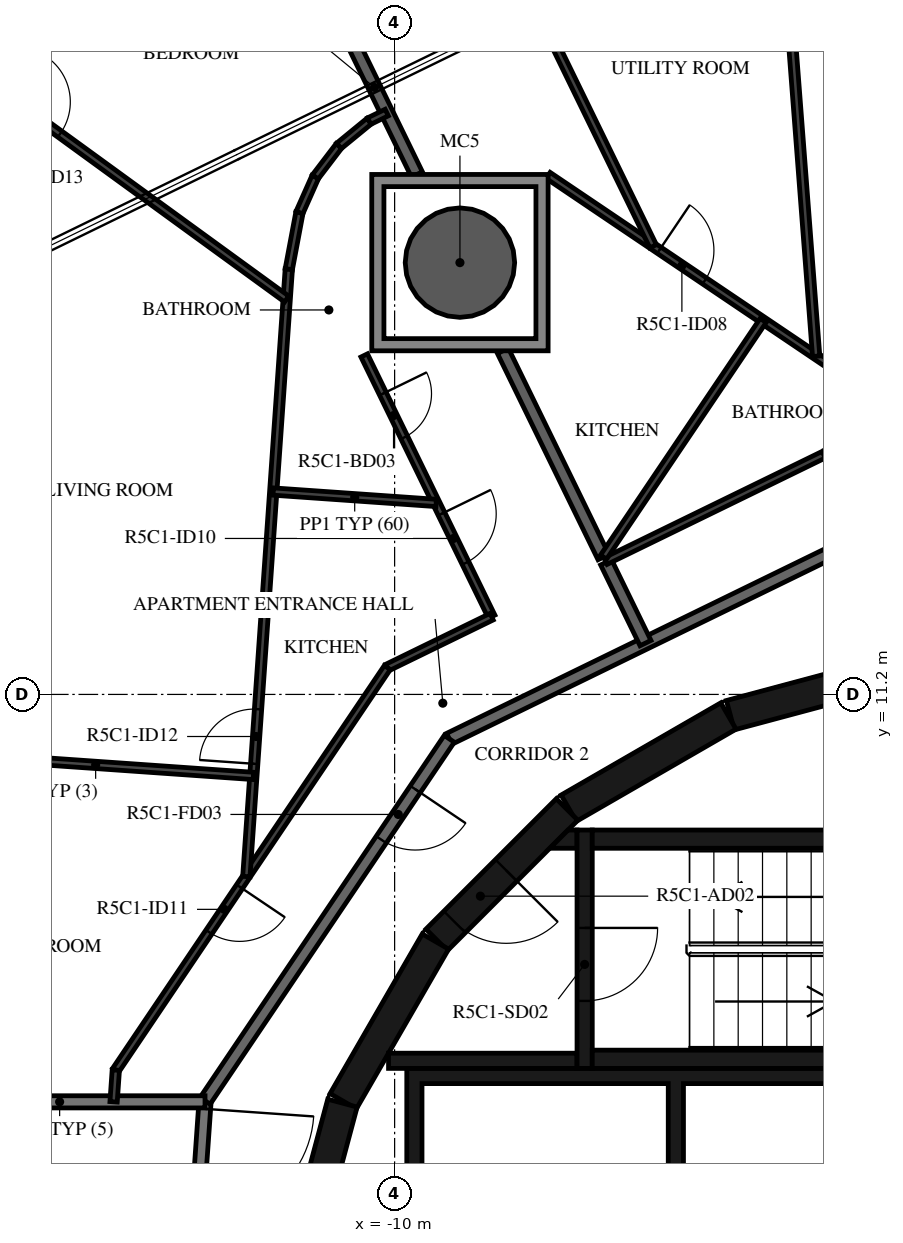
"""IFC4 building model, lengths in metres.
Left out: names, types, materials, properties, quantities, classifications, styles, units other than length and angle.
Written with IfcOpenShell. Run it as: python <this file> out.ifc"""

import sys

from ifc_helpers import new_model, si_unit, direction, frame, frame_2d, origin, origin_2d, place, context, subcontext, project, spatial, polyline, rectangle, hollow_circle, outline, extrude, element, fill, save


model = new_model("IFC4")
c1 = context("Model", 3, precision=1e-05, world=origin(), true_north=direction((0.0, 1.0)))
c2 = subcontext(c1, "Body", "Model", "MODEL_VIEW")
j1 = project(units=[si_unit("LENGTHUNIT", "METRE"), si_unit("PLANEANGLEUNIT", "RADIAN")], contexts=[c1])
p1 = place(None, origin())
s1 = spatial("IfcSite", under=j1, at=p1, CompositionType="ELEMENT")
p2 = place(p1, origin())
s2 = spatial("IfcBuilding", under=s1, at=p2, CompositionType="ELEMENT")
p3 = place(p2, frame((0.0, 0.0, 212.9)))
s3 = spatial("IfcBuildingStorey", under=s2, at=p3, CompositionType="ELEMENT", Elevation=212.9)
p4 = place(p3, frame((-8.926, 18.301, -0.38), z_axis=(0.0, 0.0, 1.0), x_axis=(1.0, 0.0, 0.0)))
e1 = element("IfcColumn", 1, at=p4, inside=s3, PredefinedType="COLUMN", context=c2, shape_type="SweptSolid", body=[
    extrude(hollow_circle(Radius=0.9, WallThickness=0.04, at=origin_2d()), origin(), (0.0, 0.0, 1.0), 3.5),
])
for number, where, z_axis, x_axis in (
    (2, (-1.55, 11.643, 0.0), (0.0, 0.0, 1.0), (-0.966, -0.259, 0.0)),
    (3, (-4.51, 10.845, 0.0), (0.0, 0.0, 1.0), (-0.866, -0.5, 0.0)),
):
    element("IfcWall", number, at=place(p3, frame(where, z_axis=z_axis, x_axis=x_axis)), inside=s3, PredefinedType="SHEAR", context=c2, shape_type="SweptSolid", body=[
        extrude(rectangle(XDim=3.033, YDim=0.5, at=frame_2d((1.516, 0.0))), origin(), (0.0, 0.0, 1.0), 3.12),
    ])
p5 = place(p3, frame((-7.164, 9.308, 0.0), z_axis=(0.0, 0.0, 1.0), x_axis=(-0.707106781187, -0.707106781187, 0.0)))
e4 = element("IfcWall", 4, at=p5, inside=s3, PredefinedType="SHEAR", context=c2, shape_type="SweptSolid", body=[
    extrude(rectangle(XDim=3.032, YDim=0.5, at=frame_2d((1.516, 0.0))), origin(), (0.0, 0.0, 1.0), 3.12),
])
p6 = place(p5, frame((1.416, 0.0, 0.0)))
e5 = element("IfcOpeningElement", 5, at=p6, cuts=e4, PredefinedType="OPENING", context=c2, shape_type="SweptSolid", body=[
    extrude(rectangle(XDim=1.2, YDim=2.1, at=frame_2d((0.6, 1.05))), frame((0.0, 0.26, 0.0), z_axis=(0.0, -1.0, 0.0), x_axis=(1.0, 0.0, 0.0)), (0.0, 0.0, 1.0), 0.52),
])
for number, where, z_axis, x_axis in (
    (6, (-9.329, 7.137, 0.0), (0.0, 0.0, 1.0), (-0.5, -0.866, 0.0)),
    (7, (-10.858, 4.479, 0.0), (0.0, 0.0, 1.0), (-0.259, -0.966, 0.0)),
):
    element("IfcWall", number, at=place(p3, frame(where, z_axis=z_axis, x_axis=x_axis)), inside=s3, PredefinedType="SHEAR", context=c2, shape_type="SweptSolid", body=[
        extrude(rectangle(XDim=3.033, YDim=0.5, at=frame_2d((1.516, 0.0))), origin(), (0.0, 0.0, 1.0), 3.12),
    ])
for number, where, z_axis, x_axis in (
    (8, (-6.75, 5.2, 0.0), (0.0, 0.0, 1.0), (1.0, 0.0, 0.0)),
    (9, (-6.75, 8.82, 0.0), (0.0, 0.0, 1.0), (1.0, 0.0, 0.0)),
):
    element("IfcWall", number, at=place(p3, frame(where, z_axis=z_axis, x_axis=x_axis)), inside=s3, PredefinedType="SHEAR", context=c2, shape_type="SweptSolid", body=[
        extrude(rectangle(XDim=6.75, YDim=0.3, at=frame_2d((3.375, 0.0))), origin(), (0.0, 0.0, 1.0), 3.12),
    ])
p7 = place(p3, frame((-6.875, 8.97, 0.0), z_axis=(0.0, 0.0, 1.0), x_axis=(0.0, -1.0, 0.0)))
e10 = element("IfcWall", 10, at=p7, inside=s3, PredefinedType="SHEAR", context=c2, shape_type="SweptSolid", body=[
    extrude(rectangle(XDim=3.92, YDim=0.25, at=frame_2d((1.96, 0.0))), origin(), (0.0, 0.0, 1.0), 3.12),
])
p8 = place(p7, frame((1.61, 0.0, 0.0)))
e11 = element("IfcOpeningElement", 11, at=p8, cuts=e10, PredefinedType="OPENING", context=c2, shape_type="SweptSolid", body=[
    extrude(rectangle(XDim=1.2, YDim=2.1, at=frame_2d((0.6, 1.05))), frame((0.0, 0.135, 0.0), z_axis=(0.0, -1.0, 0.0), x_axis=(1.0, 0.0, 0.0)), (0.0, 0.0, 1.0), 0.27),
])
p9 = place(p3, frame((-7.0, 5.175, 0.0), z_axis=(0.0, 0.0, 1.0), x_axis=(-1.0, 0.0, 0.0)))
e12 = element("IfcWall", 12, at=p9, inside=s3, PredefinedType="SHEAR", context=c2, shape_type="SweptSolid", body=[
    extrude(rectangle(XDim=3.1, YDim=0.25, at=frame_2d((1.55, 0.0))), origin(), (0.0, 0.0, 1.0), 3.12),
])
p10 = place(p3, origin())
e13 = element("IfcWall", 13, at=p10, inside=s3, PredefinedType="SHEAR", context=c2, shape_type="SweptSolid", body=[
    extrude(outline(polyline([(-7.148, 8.97), (-7.0, 8.97), (-7.0, 8.67), (-7.448, 8.67), (-7.148, 8.97)])), origin(), (0.0, 0.0, 1.0), 3.12),
])
p11 = place(p3, origin())
e14 = element("IfcWall", 14, at=p11, inside=s3, PredefinedType="SHEAR", context=c2, shape_type="SweptSolid", body=[
    extrude(outline(polyline([(-9.55, 4.8), (-5.5, 4.8), (-5.5, 1.9), (-5.25, 1.9), (-5.25, 4.8), (-1.2, 4.8), (-1.2, 1.9), (-0.95, 1.9), (-0.95, 4.8), (0.95, 4.8), (0.95, 1.9), (1.2, 1.9), (1.2, 4.8), (3.1, 4.8), (3.1, 1.9), (3.35, 1.9), (3.35, 4.8), (5.25, 4.8), (5.25, 1.9), (5.5, 1.9), (5.5, 4.8), (7.4, 4.8), (7.4, 1.9), (7.65, 1.9), (7.65, 4.8), (9.55, 4.8), (9.55, 1.9), (9.8, 1.9), (9.8, 4.8), (9.8, 5.05), (-9.8, 5.05), (-9.8, 4.8), (-9.8, 1.9), (-9.55, 1.9), (-9.55, 4.8)])), origin(), (0.0, 0.0, 1.0), 3.12),
])
p12 = place(p3, frame((-13.118, 4.5, 0.0), z_axis=(0.0, 0.0, 1.0), x_axis=(-0.069746872611, -0.99756472159, 0.0)))
e15 = element("IfcWall", 15, at=p12, inside=s3, PredefinedType="STANDARD", context=c2, shape_type="SweptSolid", body=[
    extrude(rectangle(XDim=3.574, YDim=0.2, at=frame_2d((1.787, 0.0))), origin(), (0.0, 0.0, 1.0), 3.12),
])
p13 = place(p12, frame((0.115, 0.0, 0.0)))
e16 = element("IfcOpeningElement", 16, at=p13, cuts=e15, PredefinedType="OPENING", context=c2, shape_type="SweptSolid", body=[
    extrude(rectangle(XDim=1.8, YDim=2.1, at=frame_2d((0.9, 1.05))), frame((0.0, 0.11, 0.0), z_axis=(0.0, -1.0, 0.0), x_axis=(1.0, 0.0, 0.0)), (0.0, 0.0, 1.0), 0.22),
])
p14 = place(p3, frame((-2.647, 13.618, 0.0), z_axis=(0.0, 0.0, 1.0), x_axis=(-0.898796543751, -0.438366026218, 0.0)))
e17 = element("IfcWall", 17, at=p14, inside=s3, PredefinedType="STANDARD", context=c2, shape_type="SweptSolid", body=[
    extrude(rectangle(XDim=7.181, YDim=0.2, at=frame_2d((3.591, 0.0))), origin(), (0.0, 0.0, 1.0), 3.12),
])
p15 = place(p3, frame((-9.101, 10.47, 0.0), z_axis=(0.0, 0.0, 1.0), x_axis=(-0.559195469534, -0.829035841718, 0.0)))
e18 = element("IfcWall", 18, at=p15, inside=s3, PredefinedType="STANDARD", context=c2, shape_type="SweptSolid", body=[
    extrude(rectangle(XDim=7.181, YDim=0.2, at=frame_2d((3.591, 0.0))), origin(), (0.0, 0.0, 1.0), 3.12),
])
p16 = place(p15, frame((1.0, 0.0, 0.0)))
e19 = element("IfcOpeningElement", 19, at=p16, cuts=e18, PredefinedType="OPENING", context=c2, shape_type="SweptSolid", body=[
    extrude(rectangle(XDim=1.0, YDim=2.1, at=frame_2d((0.5, 1.05))), frame((0.0, 0.11, 0.0), z_axis=(0.0, -1.0, 0.0), x_axis=(1.0, 0.0, 0.0)), (0.0, 0.0, 1.0), 0.22),
])
p17 = place(p3, frame((-13.118, 4.5, 0.0), z_axis=(0.0, 0.0, 1.0), x_axis=(-1.0, 0.0, 0.0)))
e20 = element("IfcWall", 20, at=p17, inside=s3, PredefinedType="STANDARD", context=c2, shape_type="SweptSolid", body=[
    extrude(rectangle(XDim=4.782, YDim=0.2, at=frame_2d((2.391, 0.0))), origin(), (0.0, 0.0, 1.0), 3.12),
])
p18 = place(p3, frame((-6.522, 13.373, 0.0), z_axis=(0.0, 0.0, 1.0), x_axis=(0.438277270821, -0.8988398266, 0.0)))
e21 = element("IfcWall", 21, at=p18, inside=s3, PredefinedType="STANDARD", context=c2, shape_type="SweptSolid", body=[
    extrude(rectangle(XDim=1.479, YDim=0.2, at=frame_2d((0.74, 0.0))), origin(), (0.0, 0.0, 1.0), 3.12),
])
p19 = place(p3, frame((-8.219, 16.851, 0.0), z_axis=(0.0, 0.0, 1.0), x_axis=(0.438291091101, -0.898833087654, 0.0)))
e22 = element("IfcWall", 22, at=p19, inside=s3, PredefinedType="STANDARD", context=c2, shape_type="SweptSolid", body=[
    extrude(rectangle(XDim=3.774, YDim=0.2, at=frame_2d((1.887, 0.0))), origin(), (0.0, 0.0, 1.0), 3.12),
])
p20 = place(p3, frame((-12.409, 25.442, 0.0), z_axis=(0.0, 0.0, 1.0), x_axis=(0.43838641251, -0.898786600549, 0.0)))
e23 = element("IfcWall", 23, at=p20, inside=s3, PredefinedType="STANDARD", context=c2, shape_type="SweptSolid", body=[
    extrude(rectangle(XDim=6.333, YDim=0.2, at=frame_2d((3.166, 0.0))), origin(), (0.0, 0.0, 1.0), 3.12),
])
p21 = place(p3, frame((4.477, 14.623, 0.0), z_axis=(0.0, 0.0, 1.0), x_axis=(-0.997564862172, 0.069744861884, 0.0)))
e24 = element("IfcWall", 24, at=p21, inside=s3, PredefinedType="PARTITIONING", context=c2, shape_type="SweptSolid", body=[
    extrude(rectangle(XDim=7.438, YDim=0.12, at=frame_2d((3.719, 0.0))), origin(), (0.0, 0.0, 1.0), 3.12),
])
p22 = place(p21, frame((0.2, 0.0, 0.0)))
e25 = element("IfcOpeningElement", 25, at=p22, cuts=e24, PredefinedType="OPENING", context=c2, shape_type="SweptSolid", body=[
    extrude(rectangle(XDim=0.9, YDim=2.1, at=frame_2d((0.45, 1.05))), frame((0.0, 0.07, 0.0), z_axis=(0.0, -1.0, 0.0), x_axis=(1.0, 0.0, 0.0)), (0.0, 0.0, 1.0), 0.14),
])
p23 = place(p21, frame((6.392, 0.0, 0.0)))
e26 = element("IfcOpeningElement", 26, at=p23, cuts=e24, PredefinedType="OPENING", context=c2, shape_type="SweptSolid", body=[
    extrude(rectangle(XDim=0.8, YDim=2.1, at=frame_2d((0.4, 1.05))), frame((0.0, 0.07, 0.0), z_axis=(0.0, -1.0, 0.0), x_axis=(1.0, 0.0, 0.0)), (0.0, 0.0, 1.0), 0.14),
])
p24 = place(p3, frame((-2.943, 15.142, 0.0), z_axis=(0.0, 0.0, 1.0), x_axis=(-0.89881075705, -0.438336883014, 0.0)))
e27 = element("IfcWall", 27, at=p24, inside=s3, PredefinedType="PARTITIONING", context=c2, shape_type="SweptSolid", body=[
    extrude(rectangle(XDim=3.992, YDim=0.12, at=frame_2d((1.996, 0.0))), origin(), (0.0, 0.0, 1.0), 3.12),
])
p25 = place(p3, frame((-7.476, 19.735, 0.0), z_axis=(0.0, 0.0, 1.0), x_axis=(0.829035412992, -0.559196105142, 0.0)))
e28 = element("IfcWall", 28, at=p25, inside=s3, PredefinedType="PARTITIONING", context=c2, shape_type="SweptSolid", body=[
    extrude(rectangle(XDim=8.531, YDim=0.12, at=frame_2d((4.266, 0.0))), origin(), (0.0, 0.0, 1.0), 3.12),
])
p26 = place(p25, frame((2.204, 0.0, 0.0)))
e29 = element("IfcOpeningElement", 29, at=p26, cuts=e28, PredefinedType="OPENING", context=c2, shape_type="SweptSolid", body=[
    extrude(rectangle(XDim=0.9, YDim=2.1, at=frame_2d((0.45, 1.05))), frame((0.0, 0.07, 0.0), z_axis=(0.0, -1.0, 0.0), x_axis=(1.0, 0.0, 0.0)), (0.0, 0.0, 1.0), 0.14),
])
p27 = place(p3, frame((-3.653, 24.394, 0.0), z_axis=(0.0, 0.0, 1.0), x_axis=(0.076513576433, -0.997068539581, 0.0)))
e30 = element("IfcWall", 30, at=p27, inside=s3, PredefinedType="PARTITIONING", context=c2, shape_type="SweptSolid", body=[
    extrude(rectangle(XDim=7.655, YDim=0.12, at=frame_2d((3.827, 0.0))), origin(), (0.0, 0.0, 1.0), 3.12),
])
p28 = place(p27, frame((0.6, 0.0, 0.0)))
e31 = element("IfcOpeningElement", 31, at=p28, cuts=e30, PredefinedType="OPENING", context=c2, shape_type="SweptSolid", body=[
    extrude(rectangle(XDim=0.9, YDim=2.1, at=frame_2d((0.45, 1.05))), frame((0.0, 0.07, 0.0), z_axis=(0.0, -1.0, 0.0), x_axis=(1.0, 0.0, 0.0)), (0.0, 0.0, 1.0), 0.14),
])
p29 = place(p3, frame((-3.939, 17.35, 0.0), z_axis=(0.0, 0.0, 1.0), x_axis=(-0.559193216274, -0.829037361566, 0.0)))
e32 = element("IfcWall", 32, at=p29, inside=s3, PredefinedType="PARTITIONING", context=c2, shape_type="SweptSolid", body=[
    extrude(rectangle(XDim=4.694, YDim=0.12, at=frame_2d((2.347, 0.0))), origin(), (0.0, 0.0, 1.0), 3.12),
])
p30 = place(p3, frame((-9.496, 26.254, 0.0), z_axis=(0.0, 0.0, 1.0), x_axis=(0.438361739807, -0.89879863433, 0.0)))
e33 = element("IfcWall", 33, at=p30, inside=s3, PredefinedType="PARTITIONING", context=c2, shape_type="SweptSolid", body=[
    extrude(rectangle(XDim=8.549, YDim=0.12, at=frame_2d((4.274, 0.0))), origin(), (0.0, 0.0, 1.0), 3.12),
])
p31 = place(p30, frame((0.4, 0.0, 0.0)))
e34 = element("IfcOpeningElement", 34, at=p31, cuts=e33, PredefinedType="OPENING", context=c2, shape_type="SweptSolid", body=[
    extrude(rectangle(XDim=0.9, YDim=2.1, at=frame_2d((0.45, 1.05))), frame((0.0, 0.07, 0.0), z_axis=(0.0, -1.0, 0.0), x_axis=(1.0, 0.0, 0.0)), (0.0, 0.0, 1.0), 0.14),
])
p32 = place(p3, frame((-10.5, 16.775, 0.0), z_axis=(0.0, 0.0, 1.0), x_axis=(0.438345136783, -0.898806731761, 0.0)))
e35 = element("IfcWall", 35, at=p32, inside=s3, PredefinedType="PARTITIONING", context=c2, shape_type="SweptSolid", body=[
    extrude(rectangle(XDim=4.78, YDim=0.12, at=frame_2d((2.39, 0.0))), origin(), (0.0, 0.0, 1.0), 3.12),
])
p33 = place(p32, frame((0.7, 0.0, 0.0)))
e36 = element("IfcOpeningElement", 36, at=p33, cuts=e35, PredefinedType="OPENING", context=c2, shape_type="SweptSolid", body=[
    extrude(rectangle(XDim=0.8, YDim=2.1, at=frame_2d((0.4, 1.05))), frame((0.0, 0.07, 0.0), z_axis=(0.0, -1.0, 0.0), x_axis=(1.0, 0.0, 0.0)), (0.0, 0.0, 1.0), 0.14),
])
p34 = place(p32, frame((2.899, 0.0, 0.0)))
e37 = element("IfcOpeningElement", 37, at=p34, cuts=e35, PredefinedType="OPENING", context=c2, shape_type="SweptSolid", body=[
    extrude(rectangle(XDim=0.9, YDim=2.1, at=frame_2d((0.45, 1.05))), frame((0.0, 0.07, 0.0), z_axis=(0.0, -1.0, 0.0), x_axis=(1.0, 0.0, 0.0)), (0.0, 0.0, 1.0), 0.14),
])
p35 = place(p3, frame((-8.405, 12.479, 0.0), z_axis=(0.0, 0.0, 1.0), x_axis=(-0.898784427692, -0.438390867307, 0.0)))
e38 = element("IfcWall", 38, at=p35, inside=s3, PredefinedType="PARTITIONING", context=c2, shape_type="SweptSolid", body=[
    extrude(rectangle(XDim=1.908, YDim=0.12, at=frame_2d((0.954, 0.0))), origin(), (0.0, 0.0, 1.0), 3.12),
])
p36 = place(p3, frame((-10.12, 11.642, 0.0), z_axis=(0.0, 0.0, 1.0), x_axis=(-0.55920080659, -0.829032241779, 0.0)))
e39 = element("IfcWall", 39, at=p36, inside=s3, PredefinedType="PARTITIONING", context=c2, shape_type="SweptSolid", body=[
    extrude(rectangle(XDim=7.985, YDim=0.12, at=frame_2d((3.992, 0.0))), origin(), (0.0, 0.0, 1.0), 3.12),
])
p37 = place(p36, frame((4.346, 0.0, 0.0)))
e40 = element("IfcOpeningElement", 40, at=p37, cuts=e39, PredefinedType="OPENING", context=c2, shape_type="SweptSolid", body=[
    extrude(rectangle(XDim=0.9, YDim=2.1, at=frame_2d((0.45, 1.05))), frame((0.0, 0.07, 0.0), z_axis=(0.0, -1.0, 0.0), x_axis=(1.0, 0.0, 0.0)), (0.0, 0.0, 1.0), 0.14),
])
p38 = place(p3, frame((-14.585, 5.022, 0.0), z_axis=(0.0, 0.0, 1.0), x_axis=(-0.069490327804, -0.997582625321, 0.0)))
e41 = element("IfcWall", 41, at=p38, inside=s3, PredefinedType="PARTITIONING", context=c2, shape_type="SweptSolid", body=[
    extrude(rectangle(XDim=0.523, YDim=0.12, at=frame_2d((0.262, 0.0))), origin(), (0.0, 0.0, 1.0), 3.12),
])
p39 = place(p3, frame((-12.439, 8.204, 0.0), z_axis=(0.0, 0.0, 1.0), x_axis=(0.069750037523, 0.997564500303, 0.0)))
e42 = element("IfcWall", 42, at=p39, inside=s3, PredefinedType="PARTITIONING", context=c2, shape_type="SweptSolid", body=[
    extrude(rectangle(XDim=10.014, YDim=0.12, at=frame_2d((5.007, 0.0))), origin(), (0.0, 0.0, 1.0), 3.12),
])
p40 = place(p39, frame((1.859, 0.0, 0.0)))
e43 = element("IfcOpeningElement", 43, at=p40, cuts=e42, PredefinedType="OPENING", context=c2, shape_type="SweptSolid", body=[
    extrude(rectangle(XDim=0.9, YDim=2.1, at=frame_2d((0.45, 1.05))), frame((0.0, 0.07, 0.0), z_axis=(0.0, -1.0, 0.0), x_axis=(1.0, 0.0, 0.0)), (0.0, 0.0, 1.0), 0.14),
])
p41 = place(p3, frame((-11.74, 18.194, 0.0), z_axis=(0.0, 0.0, 1.0), x_axis=(0.185144760846, 0.982711258474, 0.0)))
e44 = element("IfcWall", 44, at=p41, inside=s3, PredefinedType="PARTITIONING", context=c2, shape_type="SweptSolid", body=[
    extrude(rectangle(XDim=0.947, YDim=0.12, at=frame_2d((0.473, 0.0))), origin(), (0.0, 0.0, 1.0), 3.12),
])
for number, where, z_axis, x_axis in (
    (45, (-11.565, 19.125, 0.0), (0.0, 0.0, 1.0), (0.407, 0.914, 0.0)),
    (46, (-11.304, 19.711, 0.0), (0.0, 0.0, 1.0), (0.607, 0.795, 0.0)),
    (47, (-10.915, 20.221, 0.0), (0.0, 0.0, 1.0), (0.773, 0.634, 0.0)),
):
    element("IfcWall", number, at=place(p3, frame(where, z_axis=z_axis, x_axis=x_axis)), inside=s3, PredefinedType="PARTITIONING", context=c2, shape_type="SweptSolid", body=[
        extrude(rectangle(XDim=0.642, YDim=0.12, at=frame_2d((0.321, 0.0))), origin(), (0.0, 0.0, 1.0), 3.12),
    ])
p42 = place(p3, frame((-10.418, 20.628, 0.0), z_axis=(0.0, 0.0, 1.0), x_axis=(0.898943795765, 0.438063981692, 0.0)))
e48 = element("IfcWall", 48, at=p42, inside=s3, PredefinedType="PARTITIONING", context=c2, shape_type="SweptSolid", body=[
    extrude(rectangle(XDim=0.321, YDim=0.12, at=frame_2d((0.161, 0.0))), origin(), (0.0, 0.0, 1.0), 3.12),
])
p43 = place(p3, frame((-16.395, 21.061, 0.0), z_axis=(0.0, 0.0, 1.0), x_axis=(0.808810002497, -0.58807004673, 0.0)))
e49 = element("IfcWall", 49, at=p43, inside=s3, PredefinedType="PARTITIONING", context=c2, shape_type="SweptSolid", body=[
    extrude(rectangle(XDim=5.713, YDim=0.12, at=frame_2d((2.856, 0.0))), origin(), (0.0, 0.0, 1.0), 3.12),
])
p44 = place(p43, frame((0.2, 0.0, 0.0)))
e50 = element("IfcOpeningElement", 50, at=p44, cuts=e49, PredefinedType="OPENING", context=c2, shape_type="SweptSolid", body=[
    extrude(rectangle(XDim=0.9, YDim=2.1, at=frame_2d((0.45, 1.05))), frame((0.0, 0.07, 0.0), z_axis=(0.0, -1.0, 0.0), x_axis=(1.0, 0.0, 0.0)), (0.0, 0.0, 1.0), 0.14),
])
p45 = place(p3, frame((-11.996, 14.536, 0.0), z_axis=(0.0, 0.0, 1.0), x_axis=(0.997565991425, -0.069728708231, 0.0)))
e51 = element("IfcWall", 51, at=p45, inside=s3, PredefinedType="PARTITIONING", context=c2, shape_type="SweptSolid", body=[
    extrude(rectangle(XDim=2.686, YDim=0.12, at=frame_2d((1.343, 0.0))), origin(), (0.0, 0.0, 1.0), 3.12),
])
p46 = place(p3, frame((-17.51, 10.222, 0.0), z_axis=(0.0, 0.0, 1.0), x_axis=(0.997563184303, -0.069768856397, 0.0)))
e52 = element("IfcWall", 52, at=p46, inside=s3, PredefinedType="PARTITIONING", context=c2, shape_type="SweptSolid", body=[
    extrude(rectangle(XDim=5.2, YDim=0.12, at=frame_2d((2.6, 0.0))), origin(), (0.0, 0.0, 1.0), 2.73),
])
p47 = place(p3, origin())
e53 = element("IfcWall", 53, at=p47, inside=s3, PredefinedType="STANDARD", context=c2, shape_type="SweptSolid", body=[
    extrude(outline(polyline([(-7.476, 19.751), (-7.476, 16.851), (-10.376, 16.851), (-10.376, 19.751), (-7.476, 19.751)]), holes=[polyline([(-10.176, 17.051), (-7.676, 17.051), (-7.676, 19.551), (-10.176, 19.551), (-10.176, 17.051)])]), origin(), (0.0, 0.0, 1.0), 3.12),
])
p48 = place(p8, origin())
e54 = element("IfcDoor", 54, at=p48, inside=s3, OperationType="SINGLE_SWING_LEFT", PredefinedType="DOOR", context=c2, shape_type="SweptSolid", body=[
    extrude(rectangle(XDim=1.2, YDim=2.1, at=frame_2d((0.6, 1.05))), frame((0.0, 0.025, 0.0), z_axis=(0.0, -1.0, 0.0), x_axis=(1.0, 0.0, 0.0)), (0.0, 0.0, 1.0), 0.05),
])
fill(e11, e54)
p49 = place(p6, origin())
e55 = element("IfcDoor", 55, at=p49, inside=s3, OperationType="SINGLE_SWING_RIGHT", PredefinedType="DOOR", context=c2, shape_type="SweptSolid", body=[
    extrude(rectangle(XDim=1.2, YDim=2.1, at=frame_2d((0.6, 1.05))), frame((0.0, 0.025, 0.0), z_axis=(0.0, -1.0, 0.0), x_axis=(1.0, 0.0, 0.0)), (0.0, 0.0, 1.0), 0.05),
])
fill(e5, e55)
p50 = place(p26, origin())
e56 = element("IfcDoor", 56, at=p50, inside=s3, OperationType="SINGLE_SWING_LEFT", PredefinedType="DOOR", context=c2, shape_type="SweptSolid", body=[
    extrude(rectangle(XDim=0.9, YDim=2.1, at=frame_2d((0.45, 1.05))), frame((0.0, 0.025, 0.0), z_axis=(0.0, -1.0, 0.0), x_axis=(1.0, 0.0, 0.0)), (0.0, 0.0, 1.0), 0.05),
])
fill(e29, e56)
p51 = place(p16, origin())
e57 = element("IfcDoor", 57, at=p51, inside=s3, OperationType="SINGLE_SWING_LEFT", PredefinedType="DOOR", context=c2, shape_type="SweptSolid", body=[
    extrude(rectangle(XDim=1.0, YDim=2.1, at=frame_2d((0.5, 1.05))), frame((0.0, 0.025, 0.0), z_axis=(0.0, -1.0, 0.0), x_axis=(1.0, 0.0, 0.0)), (0.0, 0.0, 1.0), 0.05),
])
fill(e19, e57)
p52 = place(p33, origin())
e58 = element("IfcDoor", 58, at=p52, inside=s3, OperationType="SINGLE_SWING_LEFT", PredefinedType="DOOR", context=c2, shape_type="SweptSolid", body=[
    extrude(rectangle(XDim=0.8, YDim=2.1, at=frame_2d((0.4, 1.05))), frame((0.0, 0.025, 0.0), z_axis=(0.0, -1.0, 0.0), x_axis=(1.0, 0.0, 0.0)), (0.0, 0.0, 1.0), 0.05),
])
fill(e36, e58)
p53 = place(p34, origin())
e59 = element("IfcDoor", 59, at=p53, inside=s3, OperationType="SINGLE_SWING_LEFT", PredefinedType="DOOR", context=c2, shape_type="SweptSolid", body=[
    extrude(rectangle(XDim=0.9, YDim=2.1, at=frame_2d((0.45, 1.05))), frame((0.0, 0.025, 0.0), z_axis=(0.0, -1.0, 0.0), x_axis=(1.0, 0.0, 0.0)), (0.0, 0.0, 1.0), 0.05),
])
fill(e37, e59)
p54 = place(p37, origin())
e60 = element("IfcDoor", 60, at=p54, inside=s3, OperationType="SINGLE_SWING_LEFT", PredefinedType="DOOR", context=c2, shape_type="SweptSolid", body=[
    extrude(rectangle(XDim=0.9, YDim=2.1, at=frame_2d((0.45, 1.05))), frame((0.0, 0.025, 0.0), z_axis=(0.0, -1.0, 0.0), x_axis=(1.0, 0.0, 0.0)), (0.0, 0.0, 1.0), 0.05),
])
fill(e40, e60)
p55 = place(p40, origin())
e61 = element("IfcDoor", 61, at=p55, inside=s3, OperationType="SINGLE_SWING_LEFT", PredefinedType="DOOR", context=c2, shape_type="SweptSolid", body=[
    extrude(rectangle(XDim=0.9, YDim=2.1, at=frame_2d((0.45, 1.05))), frame((0.0, 0.025, 0.0), z_axis=(0.0, -1.0, 0.0), x_axis=(1.0, 0.0, 0.0)), (0.0, 0.0, 1.0), 0.05),
])
fill(e43, e61)
p56 = place(p44, origin())
e62 = element("IfcDoor", 62, at=p56, inside=s3, OperationType="SINGLE_SWING_LEFT", PredefinedType="DOOR", context=c2, shape_type="SweptSolid", body=[
    extrude(rectangle(XDim=0.9, YDim=2.1, at=frame_2d((0.45, 1.05))), frame((0.0, 0.025, 0.0), z_axis=(0.0, -1.0, 0.0), x_axis=(1.0, 0.0, 0.0)), (0.0, 0.0, 1.0), 0.05),
])
fill(e50, e62)
p57 = place(p13, origin())
e63 = element("IfcDoor", 63, at=p57, inside=s3, OperationType="DOUBLE_DOOR_SINGLE_SWING", PredefinedType="DOOR", context=c2, shape_type="SweptSolid", body=[
    extrude(rectangle(XDim=1.8, YDim=2.1, at=frame_2d((0.9, 1.05))), frame((0.0, 0.025, 0.0), z_axis=(0.0, -1.0, 0.0), x_axis=(1.0, 0.0, 0.0)), (0.0, 0.0, 1.0), 0.05),
])
fill(e16, e63)
save(model, sys.argv[1])
